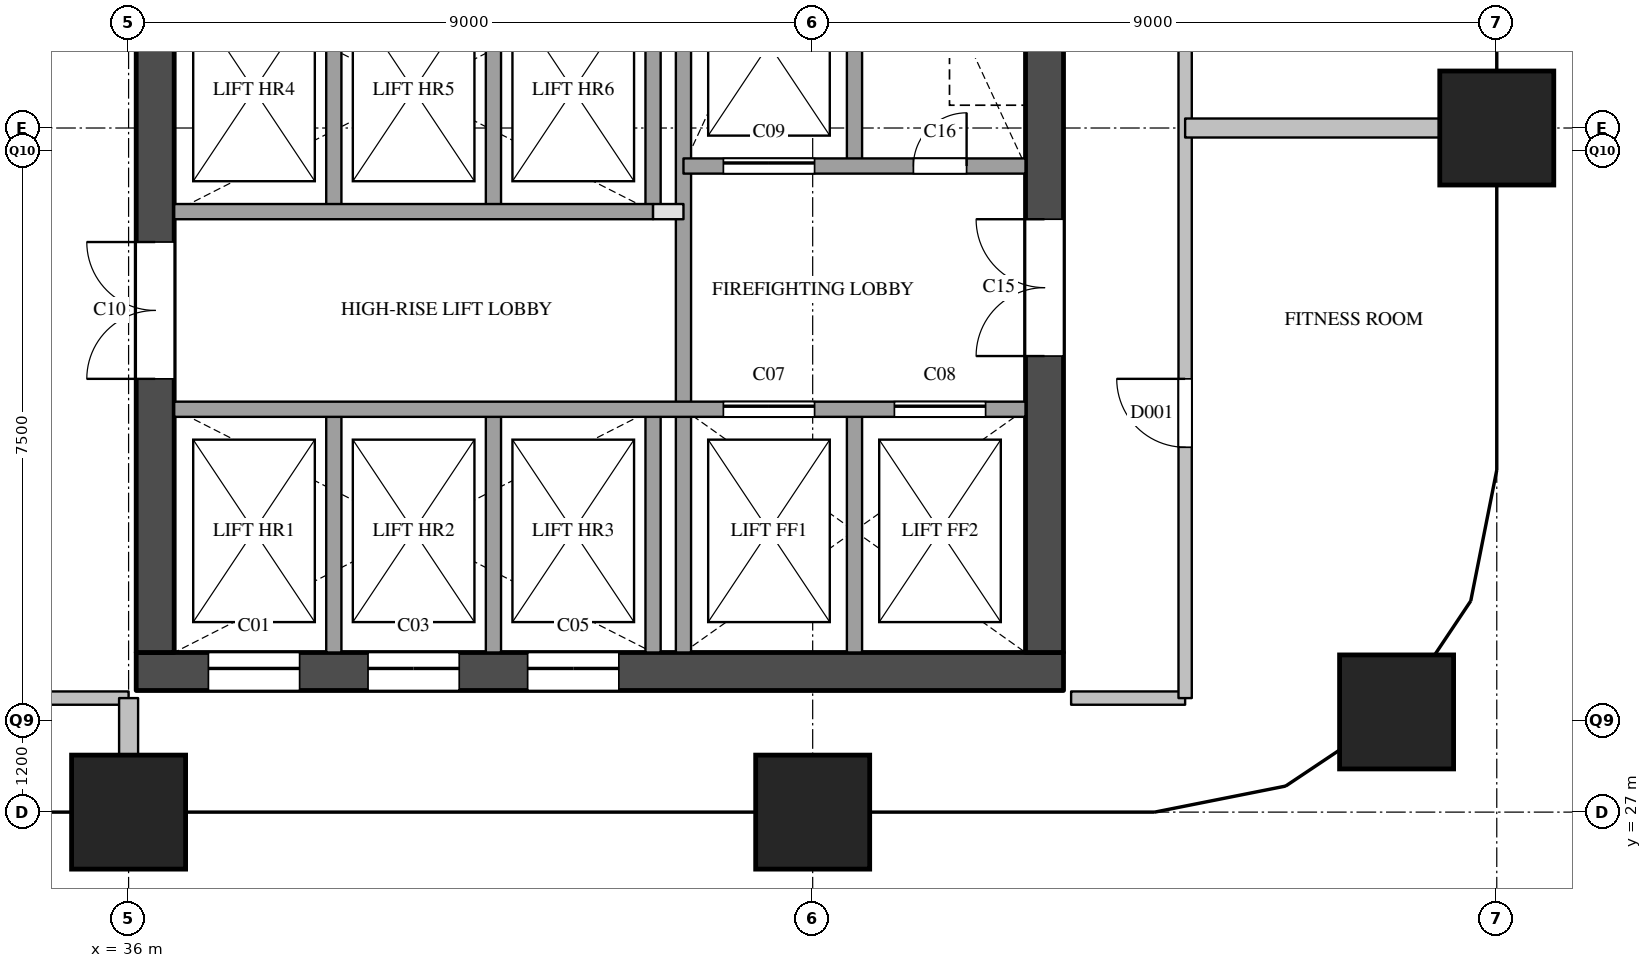
"""IFC4 building model, lengths in metres.
Left out: names, types, materials, properties, quantities, classifications, styles, units other than length and angle.
Written with IfcOpenShell. Run it as: python <this file> out.ifc"""

import sys

from ifc_helpers import new_model, si_unit, direction, frame, frame_2d, origin, origin_2d, place, context, subcontext, project, spatial, rectangle, extrude, element, fill, save


model = new_model("IFC4")
c1 = context("Model", 3, precision=1e-05, world=origin(), true_north=direction((0.0, 1.0)))
c2 = subcontext(c1, "Body", "Model", "MODEL_VIEW")
j1 = project(units=[si_unit("LENGTHUNIT", "METRE"), si_unit("PLANEANGLEUNIT", "RADIAN")], contexts=[c1])
p1 = place(None, origin())
s1 = spatial("IfcSite", under=j1, at=p1, CompositionType="ELEMENT")
p2 = place(p1, origin())
s2 = spatial("IfcBuilding", under=s1, at=p2, CompositionType="ELEMENT")
p3 = place(p2, frame((0.0, 0.0, 173.9)))
s3 = spatial("IfcBuildingStorey", under=s2, at=p3, CompositionType="ELEMENT", Elevation=173.9)
for number, where, z_axis, x_axis in (
    (1, (36.0, 27.0, 0.0), (0.0, 0.0, 1.0), (1.0, 0.0, 0.0)),
    (2, (45.0, 27.0, 0.0), (0.0, 0.0, 1.0), (1.0, 0.0, 0.0)),
    (3, (52.682, 28.318, 0.0), (0.0, 0.0, 1.0), (1.0, 0.0, 0.0)),
    (4, (54.0, 36.0, 0.0), (0.0, 0.0, 1.0), (1.0, 0.0, 0.0)),
):
    element("IfcColumn", number, at=place(p3, frame(where, z_axis=z_axis, x_axis=x_axis)), inside=s3, PredefinedType="COLUMN", context=c2, shape_type="SweptSolid", body=[
        extrude(rectangle(XDim=1.5, YDim=1.5, at=origin_2d()), origin(), (0.0, 0.0, 1.0), 3.9),
    ])
p4 = place(p3, frame((36.1, 28.85, 0.0), z_axis=(0.0, 0.0, 1.0), x_axis=(1.0, 0.0, 0.0)))
e5 = element("IfcWall", 5, at=p4, inside=s3, PredefinedType="SHEAR", context=c2, shape_type="SweptSolid", body=[
    extrude(rectangle(XDim=12.2, YDim=0.5, at=frame_2d((6.1, 0.0))), origin(), (0.0, 0.0, 1.0), 3.6),
])
p5 = place(p4, frame((0.95, 0.0, 0.0)))
e6 = element("IfcOpeningElement", 6, at=p5, cuts=e5, PredefinedType="OPENING", context=c2, shape_type="SweptSolid", body=[
    extrude(rectangle(XDim=1.2, YDim=2.1, at=frame_2d((0.6, 1.05))), frame((0.0, 0.26, 0.0), z_axis=(0.0, -1.0, 0.0), x_axis=(1.0, 0.0, 0.0)), (0.0, 0.0, 1.0), 0.52),
])
p6 = place(p4, frame((3.05, 0.0, 0.0)))
e7 = element("IfcOpeningElement", 7, at=p6, cuts=e5, PredefinedType="OPENING", context=c2, shape_type="SweptSolid", body=[
    extrude(rectangle(XDim=1.2, YDim=2.1, at=frame_2d((0.6, 1.05))), frame((0.0, 0.26, 0.0), z_axis=(0.0, -1.0, 0.0), x_axis=(1.0, 0.0, 0.0)), (0.0, 0.0, 1.0), 0.52),
])
p7 = place(p4, frame((5.15, 0.0, 0.0)))
e8 = element("IfcOpeningElement", 8, at=p7, cuts=e5, PredefinedType="OPENING", context=c2, shape_type="SweptSolid", body=[
    extrude(rectangle(XDim=1.2, YDim=2.1, at=frame_2d((0.6, 1.05))), frame((0.0, 0.26, 0.0), z_axis=(0.0, -1.0, 0.0), x_axis=(1.0, 0.0, 0.0)), (0.0, 0.0, 1.0), 0.52),
])
p8 = place(p3, frame((36.35, 29.1, 0.0), z_axis=(0.0, 0.0, 1.0), x_axis=(0.0, 1.0, 0.0)))
e9 = element("IfcWall", 9, at=p8, inside=s3, PredefinedType="SHEAR", context=c2, shape_type="SweptSolid", body=[
    extrude(rectangle(XDim=20.3, YDim=0.5, at=frame_2d((10.15, 0.0))), origin(), (0.0, 0.0, 1.0), 3.6),
])
p9 = place(p8, frame((3.6, 0.0, 0.0)))
e10 = element("IfcOpeningElement", 10, at=p9, cuts=e9, PredefinedType="OPENING", context=c2, shape_type="SweptSolid", body=[
    extrude(rectangle(XDim=1.8, YDim=2.1, at=frame_2d((0.9, 1.05))), frame((0.0, 0.26, 0.0), z_axis=(0.0, -1.0, 0.0), x_axis=(1.0, 0.0, 0.0)), (0.0, 0.0, 1.0), 0.52),
])
p10 = place(p8, frame((16.4, 0.0, 0.0)))
e11 = element("IfcOpeningElement", 11, at=p10, cuts=e9, PredefinedType="OPENING", context=c2, shape_type="SweptSolid", body=[
    extrude(rectangle(XDim=1.0, YDim=2.1, at=frame_2d((0.5, 1.05))), frame((0.0, 0.26, 0.0), z_axis=(0.0, -1.0, 0.0), x_axis=(1.0, 0.0, 0.0)), (0.0, 0.0, 1.0), 0.52),
])
p11 = place(p3, frame((48.05, 29.1, 0.0), z_axis=(0.0, 0.0, 1.0), x_axis=(0.0, 1.0, 0.0)))
e12 = element("IfcWall", 12, at=p11, inside=s3, PredefinedType="SHEAR", context=c2, shape_type="SweptSolid", body=[
    extrude(rectangle(XDim=20.3, YDim=0.5, at=frame_2d((10.15, 0.0))), origin(), (0.0, 0.0, 1.0), 3.6),
])
p12 = place(p11, frame((12.5, 0.0, 0.0)))
e13 = element("IfcOpeningElement", 13, at=p12, cuts=e12, PredefinedType="OPENING", context=c2, shape_type="SweptSolid", body=[
    extrude(rectangle(XDim=0.7, YDim=2.1, at=frame_2d((0.35, 1.05))), frame((0.0, 0.26, 0.0), z_axis=(0.0, -1.0, 0.0), x_axis=(1.0, 0.0, 0.0)), (0.0, 0.0, 1.0), 0.52),
])
p13 = place(p11, frame((3.9, 0.0, 0.0)))
e14 = element("IfcOpeningElement", 14, at=p13, cuts=e12, PredefinedType="OPENING", context=c2, shape_type="SweptSolid", body=[
    extrude(rectangle(XDim=1.8, YDim=2.1, at=frame_2d((0.9, 1.05))), frame((0.0, 0.26, 0.0), z_axis=(0.0, -1.0, 0.0), x_axis=(1.0, 0.0, 0.0)), (0.0, 0.0, 1.0), 0.52),
])
p14 = place(p3, frame((38.7, 29.1, 0.0), z_axis=(0.0, 0.0, 1.0), x_axis=(0.0, 1.0, 0.0)))
e15 = element("IfcWall", 15, at=p14, inside=s3, PredefinedType="SOLIDWALL", context=c2, shape_type="SweptSolid", body=[
    extrude(rectangle(XDim=3.2, YDim=0.2, at=frame_2d((1.6, 0.0))), origin(), (0.0, 0.0, 1.0), 3.6),
])
p15 = place(p3, frame((38.7, 34.9, 0.0), z_axis=(0.0, 0.0, 1.0), x_axis=(0.0, 1.0, 0.0)))
e16 = element("IfcWall", 16, at=p15, inside=s3, PredefinedType="SOLIDWALL", context=c2, shape_type="SweptSolid", body=[
    extrude(rectangle(XDim=3.2, YDim=0.2, at=frame_2d((1.6, 0.0))), origin(), (0.0, 0.0, 1.0), 3.6),
])
p16 = place(p3, frame((40.8, 29.1, 0.0), z_axis=(0.0, 0.0, 1.0), x_axis=(0.0, 1.0, 0.0)))
e17 = element("IfcWall", 17, at=p16, inside=s3, PredefinedType="SOLIDWALL", context=c2, shape_type="SweptSolid", body=[
    extrude(rectangle(XDim=3.2, YDim=0.2, at=frame_2d((1.6, 0.0))), origin(), (0.0, 0.0, 1.0), 3.6),
])
p17 = place(p3, frame((40.8, 34.9, 0.0), z_axis=(0.0, 0.0, 1.0), x_axis=(0.0, 1.0, 0.0)))
e18 = element("IfcWall", 18, at=p17, inside=s3, PredefinedType="SOLIDWALL", context=c2, shape_type="SweptSolid", body=[
    extrude(rectangle(XDim=3.2, YDim=0.2, at=frame_2d((1.6, 0.0))), origin(), (0.0, 0.0, 1.0), 3.6),
])
p18 = place(p3, frame((42.9, 29.1, 0.0), z_axis=(0.0, 0.0, 1.0), x_axis=(0.0, 1.0, 0.0)))
e19 = element("IfcWall", 19, at=p18, inside=s3, PredefinedType="SOLIDWALL", context=c2, shape_type="SweptSolid", body=[
    extrude(rectangle(XDim=3.2, YDim=0.2, at=frame_2d((1.6, 0.0))), origin(), (0.0, 0.0, 1.0), 3.6),
])
p19 = place(p3, frame((42.9, 34.9, 0.0), z_axis=(0.0, 0.0, 1.0), x_axis=(0.0, 1.0, 0.0)))
e20 = element("IfcWall", 20, at=p19, inside=s3, PredefinedType="SOLIDWALL", context=c2, shape_type="SweptSolid", body=[
    extrude(rectangle(XDim=3.2, YDim=0.2, at=frame_2d((1.6, 0.0))), origin(), (0.0, 0.0, 1.0), 3.6),
])
p20 = place(p3, frame((43.3, 29.1, 0.0), z_axis=(0.0, 0.0, 1.0), x_axis=(0.0, 1.0, 0.0)))
e21 = element("IfcWall", 21, at=p20, inside=s3, PredefinedType="SOLIDWALL", context=c2, shape_type="SweptSolid", body=[
    extrude(rectangle(XDim=9.9, YDim=0.2, at=frame_2d((4.95, 0.0))), origin(), (0.0, 0.0, 1.0), 3.6),
])
for number, where, z_axis, x_axis in (
    (22, (45.55, 29.1, 0.0), (0.0, 0.0, 1.0), (0.0, 1.0, 0.0)),
    (23, (45.55, 35.5, 0.0), (0.0, 0.0, 1.0), (0.0, 1.0, 0.0)),
):
    element("IfcWall", number, at=place(p3, frame(where, z_axis=z_axis, x_axis=x_axis)), inside=s3, PredefinedType="SOLIDWALL", context=c2, shape_type="SweptSolid", body=[
        extrude(rectangle(XDim=3.2, YDim=0.2, at=frame_2d((1.6, 0.0))), origin(), (0.0, 0.0, 1.0), 3.6),
    ])
p21 = place(p3, frame((36.6, 32.3, 0.0), z_axis=(0.0, 0.0, 1.0), x_axis=(1.0, 0.0, 0.0)))
e24 = element("IfcWall", 24, at=p21, inside=s3, PredefinedType="SOLIDWALL", context=c2, shape_type="SweptSolid", body=[
    extrude(rectangle(XDim=11.2, YDim=0.2, at=frame_2d((5.6, 0.0))), origin(), (0.0, 0.0, 1.0), 3.6),
])
p22 = place(p21, frame((7.225, 0.0, 0.0)))
e25 = element("IfcOpeningElement", 25, at=p22, cuts=e24, PredefinedType="OPENING", context=c2, shape_type="SweptSolid", body=[
    extrude(rectangle(XDim=1.2, YDim=2.1, at=frame_2d((0.6, 1.05))), frame((0.0, 0.11, 0.0), z_axis=(0.0, -1.0, 0.0), x_axis=(1.0, 0.0, 0.0)), (0.0, 0.0, 1.0), 0.22),
])
p23 = place(p21, frame((9.475, 0.0, 0.0)))
e26 = element("IfcOpeningElement", 26, at=p23, cuts=e24, PredefinedType="OPENING", context=c2, shape_type="SweptSolid", body=[
    extrude(rectangle(XDim=1.2, YDim=2.1, at=frame_2d((0.6, 1.05))), frame((0.0, 0.11, 0.0), z_axis=(0.0, -1.0, 0.0), x_axis=(1.0, 0.0, 0.0)), (0.0, 0.0, 1.0), 0.22),
])
p24 = place(p3, frame((42.9, 34.9, 0.0), z_axis=(0.0, 0.0, 1.0), x_axis=(1.0, 0.0, 0.0)))
e27 = element("IfcWall", 27, at=p24, inside=s3, PredefinedType="PARTITIONING", context=c2, shape_type="SweptSolid", body=[
    extrude(rectangle(XDim=0.4, YDim=0.2, at=frame_2d((0.2, 0.0))), origin(), (0.0, 0.0, 1.0), 3.6),
])
p25 = place(p3, frame((36.6, 34.9, 0.0), z_axis=(0.0, 0.0, 1.0), x_axis=(1.0, 0.0, 0.0)))
e28 = element("IfcWall", 28, at=p25, inside=s3, PredefinedType="SOLIDWALL", context=c2, shape_type="SweptSolid", body=[
    extrude(rectangle(XDim=6.3, YDim=0.2, at=frame_2d((3.15, 0.0))), origin(), (0.0, 0.0, 1.0), 3.6),
])
p26 = place(p3, frame((43.3, 35.5, 0.0), z_axis=(0.0, 0.0, 1.0), x_axis=(1.0, 0.0, 0.0)))
e29 = element("IfcWall", 29, at=p26, inside=s3, PredefinedType="SOLIDWALL", context=c2, shape_type="SweptSolid", body=[
    extrude(rectangle(XDim=4.5, YDim=0.2, at=frame_2d((2.25, 0.0))), origin(), (0.0, 0.0, 1.0), 3.6),
])
p27 = place(p26, frame((0.525, 0.0, 0.0)))
e30 = element("IfcOpeningElement", 30, at=p27, cuts=e29, PredefinedType="OPENING", context=c2, shape_type="SweptSolid", body=[
    extrude(rectangle(XDim=1.2, YDim=2.1, at=frame_2d((0.6, 1.05))), frame((0.0, 0.11, 0.0), z_axis=(0.0, -1.0, 0.0), x_axis=(1.0, 0.0, 0.0)), (0.0, 0.0, 1.0), 0.22),
])
p28 = place(p26, frame((3.025, 0.0, 0.0)))
e31 = element("IfcOpeningElement", 31, at=p28, cuts=e29, PredefinedType="OPENING", context=c2, shape_type="SweptSolid", body=[
    extrude(rectangle(XDim=0.7, YDim=2.1, at=frame_2d((0.35, 1.05))), frame((0.0, 0.11, 0.0), z_axis=(0.0, -1.0, 0.0), x_axis=(1.0, 0.0, 0.0)), (0.0, 0.0, 1.0), 0.22),
])
for number, where, z_axis, x_axis in (
    (32, (34.5, 28.5, 0.0), (0.0, 0.0, 1.0), (1.0, 0.0, 0.0)),
    (33, (48.4, 28.5, 0.0), (0.0, 0.0, 1.0), (1.0, 0.0, 0.0)),
):
    element("IfcWall", number, at=place(p3, frame(where, z_axis=z_axis, x_axis=x_axis)), inside=s3, PredefinedType="PARTITIONING", context=c2, shape_type="SweptSolid", body=[
        extrude(rectangle(XDim=1.5, YDim=0.175, at=frame_2d((0.75, 0.0))), origin(), (0.0, 0.0, 1.0), 3.6),
    ])
p29 = place(p3, frame((49.9, 28.5, 0.0), z_axis=(0.0, 0.0, 1.0), x_axis=(0.0, 1.0, 0.0)))
e34 = element("IfcWall", 34, at=p29, inside=s3, PredefinedType="PARTITIONING", context=c2, shape_type="SweptSolid", body=[
    extrude(rectangle(XDim=23.0, YDim=0.175, at=frame_2d((11.5, 0.0))), origin(), (0.0, 0.0, 1.0), 3.6),
])
p30 = place(p29, frame((3.3, 0.0, 0.0)))
e35 = element("IfcOpeningElement", 35, at=p30, cuts=e34, PredefinedType="OPENING", context=c2, shape_type="SweptSolid", body=[
    extrude(rectangle(XDim=0.9, YDim=2.1, at=frame_2d((0.45, 1.05))), frame((0.0, 0.097, 0.0), z_axis=(0.0, -1.0, 0.0), x_axis=(1.0, 0.0, 0.0)), (0.0, 0.0, 1.0), 0.195),
])
p31 = place(p29, frame((13.05, 0.0, 0.0)))
e36 = element("IfcOpeningElement", 36, at=p31, cuts=e34, PredefinedType="OPENING", context=c2, shape_type="SweptSolid", body=[
    extrude(rectangle(XDim=0.9, YDim=2.1, at=frame_2d((0.45, 1.05))), frame((0.0, 0.097, 0.0), z_axis=(0.0, -1.0, 0.0), x_axis=(1.0, 0.0, 0.0)), (0.0, 0.0, 1.0), 0.195),
])
p32 = place(p3, frame((49.9, 36.0, 0.0), z_axis=(0.0, 0.0, 1.0), x_axis=(1.0, 0.0, 0.0)))
e37 = element("IfcWall", 37, at=p32, inside=s3, PredefinedType="PARTITIONING", context=c2, shape_type="SweptSolid", body=[
    extrude(rectangle(XDim=4.1, YDim=0.25, at=frame_2d((2.05, 0.0))), origin(), (0.0, 0.0, 1.0), 3.6),
])
p33 = place(p3, frame((36.0, 27.0, 0.0), z_axis=(0.0, 0.0, 1.0), x_axis=(0.0, 1.0, 0.0)))
e38 = element("IfcWall", 38, at=p33, inside=s3, PredefinedType="PARTITIONING", context=c2, shape_type="SweptSolid", body=[
    extrude(rectangle(XDim=1.5, YDim=0.25, at=frame_2d((0.75, 0.0))), origin(), (0.0, 0.0, 1.0), 3.6),
])
p34 = place(p5, origin())
e39 = element("IfcDoor", 39, at=p34, inside=s3, OperationType="SLIDING_TO_LEFT", PredefinedType="DOOR", context=c2, shape_type="SweptSolid", body=[
    extrude(rectangle(XDim=1.2, YDim=2.1, at=frame_2d((0.6, 1.05))), frame((0.0, 0.025, 0.0), z_axis=(0.0, -1.0, 0.0), x_axis=(1.0, 0.0, 0.0)), (0.0, 0.0, 1.0), 0.05),
])
fill(e6, e39)
p35 = place(p6, origin())
e40 = element("IfcDoor", 40, at=p35, inside=s3, OperationType="SLIDING_TO_LEFT", PredefinedType="DOOR", context=c2, shape_type="SweptSolid", body=[
    extrude(rectangle(XDim=1.2, YDim=2.1, at=frame_2d((0.6, 1.05))), frame((0.0, 0.025, 0.0), z_axis=(0.0, -1.0, 0.0), x_axis=(1.0, 0.0, 0.0)), (0.0, 0.0, 1.0), 0.05),
])
fill(e7, e40)
p36 = place(p7, origin())
e41 = element("IfcDoor", 41, at=p36, inside=s3, OperationType="SLIDING_TO_LEFT", PredefinedType="DOOR", context=c2, shape_type="SweptSolid", body=[
    extrude(rectangle(XDim=1.2, YDim=2.1, at=frame_2d((0.6, 1.05))), frame((0.0, 0.025, 0.0), z_axis=(0.0, -1.0, 0.0), x_axis=(1.0, 0.0, 0.0)), (0.0, 0.0, 1.0), 0.05),
])
fill(e8, e41)
p37 = place(p22, origin())
e42 = element("IfcDoor", 42, at=p37, inside=s3, OperationType="SLIDING_TO_LEFT", PredefinedType="DOOR", context=c2, shape_type="SweptSolid", body=[
    extrude(rectangle(XDim=1.2, YDim=2.1, at=frame_2d((0.6, 1.05))), frame((0.0, 0.025, 0.0), z_axis=(0.0, -1.0, 0.0), x_axis=(1.0, 0.0, 0.0)), (0.0, 0.0, 1.0), 0.05),
])
fill(e25, e42)
p38 = place(p23, origin())
e43 = element("IfcDoor", 43, at=p38, inside=s3, OperationType="SLIDING_TO_LEFT", PredefinedType="DOOR", context=c2, shape_type="SweptSolid", body=[
    extrude(rectangle(XDim=1.2, YDim=2.1, at=frame_2d((0.6, 1.05))), frame((0.0, 0.025, 0.0), z_axis=(0.0, -1.0, 0.0), x_axis=(1.0, 0.0, 0.0)), (0.0, 0.0, 1.0), 0.05),
])
fill(e26, e43)
p39 = place(p27, origin())
e44 = element("IfcDoor", 44, at=p39, inside=s3, OperationType="SLIDING_TO_LEFT", PredefinedType="DOOR", context=c2, shape_type="SweptSolid", body=[
    extrude(rectangle(XDim=1.2, YDim=2.1, at=frame_2d((0.6, 1.05))), frame((0.0, 0.025, 0.0), z_axis=(0.0, -1.0, 0.0), x_axis=(1.0, 0.0, 0.0)), (0.0, 0.0, 1.0), 0.05),
])
fill(e30, e44)
p40 = place(p9, origin())
e45 = element("IfcDoor", 45, at=p40, inside=s3, OperationType="DOUBLE_DOOR_SINGLE_SWING", PredefinedType="DOOR", context=c2, shape_type="SweptSolid", body=[
    extrude(rectangle(XDim=1.8, YDim=2.1, at=frame_2d((0.9, 1.05))), frame((0.0, 0.025, 0.0), z_axis=(0.0, -1.0, 0.0), x_axis=(1.0, 0.0, 0.0)), (0.0, 0.0, 1.0), 0.05),
])
fill(e10, e45)
p41 = place(p13, origin())
e46 = element("IfcDoor", 46, at=p41, inside=s3, OperationType="DOUBLE_DOOR_SINGLE_SWING", PredefinedType="DOOR", context=c2, shape_type="SweptSolid", body=[
    extrude(rectangle(XDim=1.8, YDim=2.1, at=frame_2d((0.9, 1.05))), frame((0.0, 0.025, 0.0), z_axis=(0.0, -1.0, 0.0), x_axis=(1.0, 0.0, 0.0)), (0.0, 0.0, 1.0), 0.05),
])
fill(e14, e46)
p42 = place(p28, origin())
e47 = element("IfcDoor", 47, at=p42, inside=s3, OperationType="SINGLE_SWING_RIGHT", PredefinedType="DOOR", context=c2, shape_type="SweptSolid", body=[
    extrude(rectangle(XDim=0.7, YDim=2.1, at=frame_2d((0.35, 1.05))), frame((0.0, 0.025, 0.0), z_axis=(0.0, -1.0, 0.0), x_axis=(1.0, 0.0, 0.0)), (0.0, 0.0, 1.0), 0.05),
])
fill(e31, e47)
p43 = place(p30, origin())
e48 = element("IfcDoor", 48, at=p43, inside=s3, OperationType="SINGLE_SWING_RIGHT", PredefinedType="DOOR", context=c2, shape_type="SweptSolid", body=[
    extrude(rectangle(XDim=0.9, YDim=2.1, at=frame_2d((0.45, 1.05))), frame((0.0, 0.025, 0.0), z_axis=(0.0, -1.0, 0.0), x_axis=(1.0, 0.0, 0.0)), (0.0, 0.0, 1.0), 0.05),
])
fill(e35, e48)
save(model, sys.argv[1])
